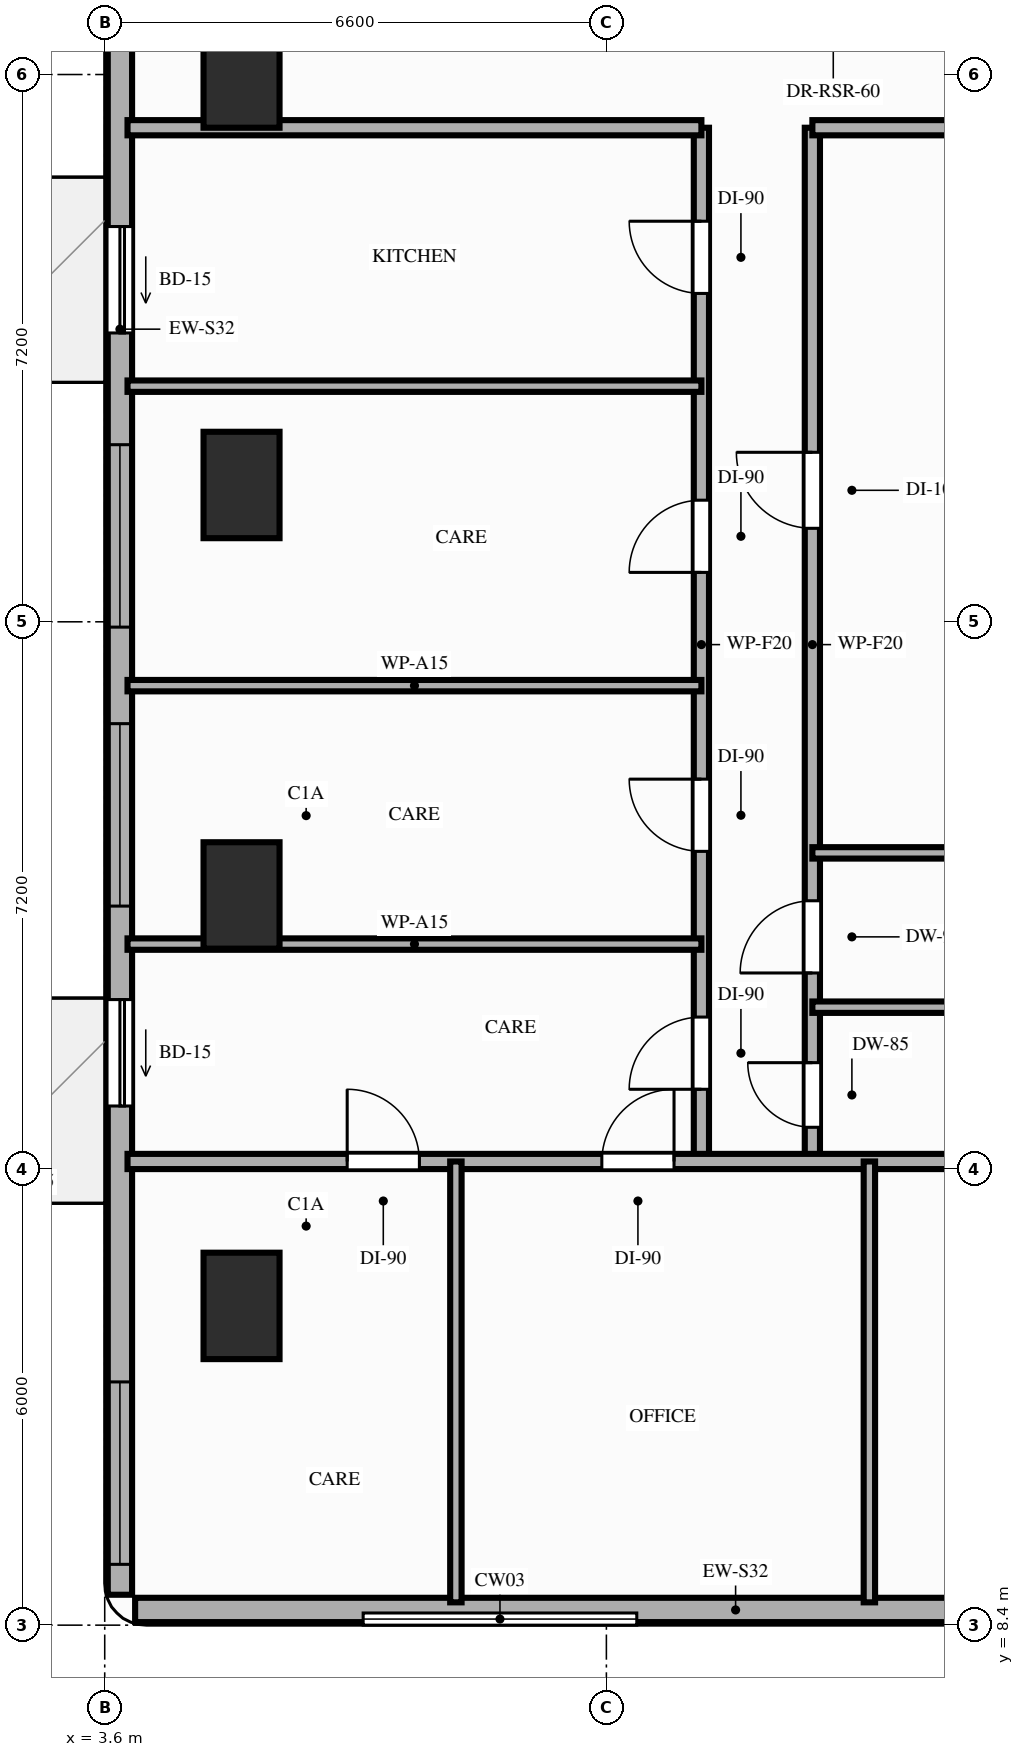
"""IFC4 building model, lengths in metres.
Left out: names, types, materials, properties, quantities, classifications, styles, units other than length and angle.
Written with IfcOpenShell. Run it as: python <this file> out.ifc"""

import sys

from ifc_helpers import new_model, si_unit, direction, frame, frame_2d, origin, origin_2d, place, context, subcontext, project, spatial, rectangle, extrude, element, fill, save


model = new_model("IFC4")
c1 = context("Model", 3, precision=1e-05, world=origin(), true_north=direction((0.0, 1.0)))
c2 = subcontext(c1, "Body", "Model", "MODEL_VIEW")
j1 = project(units=[si_unit("LENGTHUNIT", "METRE"), si_unit("PLANEANGLEUNIT", "RADIAN")], contexts=[c1])
p1 = place(None, origin())
s1 = spatial("IfcSite", under=j1, at=p1, CompositionType="ELEMENT")
p2 = place(p1, origin())
s2 = spatial("IfcBuilding", under=s1, at=p2, CompositionType="ELEMENT")
p3 = place(p2, frame((0.0, 0.0, 53.2)))
s3 = spatial("IfcBuildingStorey", under=s2, at=p3, CompositionType="ELEMENT", Elevation=53.2)
for number, where, z_axis, x_axis in (
    (1, (5.4, 12.6, 0.0), (0.0, 0.0, 1.0), (1.0, 0.0, 0.0)),
    (2, (5.4, 18.0, 0.0), (0.0, 0.0, 1.0), (1.0, 0.0, 0.0)),
    (3, (5.4, 23.4, 0.0), (0.0, 0.0, 1.0), (1.0, 0.0, 0.0)),
    (4, (5.4, 28.8, 0.0), (0.0, 0.0, 1.0), (1.0, 0.0, 0.0)),
):
    element("IfcColumn", number, at=place(p3, frame(where, z_axis=z_axis, x_axis=x_axis)), inside=s3, PredefinedType="COLUMN", context=c2, shape_type="SweptSolid", body=[
        extrude(rectangle(XDim=1.0, YDim=1.4, at=origin_2d()), origin(), (0.0, 0.0, 1.0), 3.2),
    ])
p4 = place(p3, frame((4.0, 8.6, 0.0), z_axis=(0.0, 0.0, 1.0), x_axis=(1.0, 0.0, 0.0)))
e5 = element("IfcWall", 5, at=p4, inside=s3, PredefinedType="STANDARD", context=c2, shape_type="SweptSolid", body=[
    extrude(rectangle(XDim=15.8, YDim=0.32, at=frame_2d((7.9, 0.0))), origin(), (0.0, 0.0, 1.0), 3.02),
])
p5 = place(p4, frame((11.2, 0.0, 0.85)))
e6 = element("IfcOpeningElement", 6, at=p5, cuts=e5, PredefinedType="OPENING", context=c2, shape_type="SweptSolid", body=[
    extrude(rectangle(XDim=2.4, YDim=1.8, at=frame_2d((1.2, 0.9))), frame((0.0, 0.17, 0.0), z_axis=(0.0, -1.0, 0.0), x_axis=(1.0, 0.0, 0.0)), (0.0, 0.0, 1.0), 0.34),
])
p6 = place(p3, frame((3.8, 42.1, 0.0), z_axis=(0.0, 0.0, 1.0), x_axis=(0.0, -1.0, 0.0)))
e7 = element("IfcWall", 7, at=p6, inside=s3, PredefinedType="STANDARD", context=c2, shape_type="SweptSolid", body=[
    extrude(rectangle(XDim=33.3, YDim=0.32, at=frame_2d((16.65, 0.0))), origin(), (0.0, 0.0, 1.0), 2.71),
])
p7 = place(p6, frame((25.47, 0.0, 0.0)))
e8 = element("IfcOpeningElement", 8, at=p7, cuts=e7, PredefinedType="OPENING", context=c2, shape_type="SweptSolid", body=[
    extrude(rectangle(XDim=1.4, YDim=2.1, at=frame_2d((0.7, 1.05))), frame((0.0, 0.17, 0.0), z_axis=(0.0, -1.0, 0.0), x_axis=(1.0, 0.0, 0.0)), (0.0, 0.0, 1.0), 0.34),
])
p8 = place(p6, frame((15.3, 0.0, 0.0)))
e9 = element("IfcOpeningElement", 9, at=p8, cuts=e7, PredefinedType="OPENING", context=c2, shape_type="SweptSolid", body=[
    extrude(rectangle(XDim=1.4, YDim=2.1, at=frame_2d((0.7, 1.05))), frame((0.0, 0.17, 0.0), z_axis=(0.0, -1.0, 0.0), x_axis=(1.0, 0.0, 0.0)), (0.0, 0.0, 1.0), 0.34),
])
p9 = place(p6, frame((21.84, 0.0, 0.85)))
e10 = element("IfcOpeningElement", 10, at=p9, cuts=e7, PredefinedType="OPENING", context=c2, shape_type="SweptSolid", body=[
    extrude(rectangle(XDim=2.4, YDim=1.61, at=frame_2d((1.2, 0.805))), frame((0.0, 0.17, 0.0), z_axis=(0.0, -1.0, 0.0), x_axis=(1.0, 0.0, 0.0)), (0.0, 0.0, 1.0), 0.34),
])
p10 = place(p6, frame((18.17, 0.0, 0.85)))
e11 = element("IfcOpeningElement", 11, at=p10, cuts=e7, PredefinedType="OPENING", context=c2, shape_type="SweptSolid", body=[
    extrude(rectangle(XDim=2.4, YDim=1.61, at=frame_2d((1.2, 0.805))), frame((0.0, 0.17, 0.0), z_axis=(0.0, -1.0, 0.0), x_axis=(1.0, 0.0, 0.0)), (0.0, 0.0, 1.0), 0.34),
])
p11 = place(p6, frame((30.5, 0.0, 0.85)))
e12 = element("IfcOpeningElement", 12, at=p11, cuts=e7, PredefinedType="OPENING", context=c2, shape_type="SweptSolid", body=[
    extrude(rectangle(XDim=2.4, YDim=1.61, at=frame_2d((1.2, 0.805))), frame((0.0, 0.17, 0.0), z_axis=(0.0, -1.0, 0.0), x_axis=(1.0, 0.0, 0.0)), (0.0, 0.0, 1.0), 0.34),
])
p12 = place(p6, frame((9.6, 0.0, 0.85)))
e13 = element("IfcOpeningElement", 13, at=p12, cuts=e7, PredefinedType="OPENING", context=c2, shape_type="SweptSolid", body=[
    extrude(rectangle(XDim=2.4, YDim=1.61, at=frame_2d((1.2, 0.805))), frame((0.0, 0.17, 0.0), z_axis=(0.0, -1.0, 0.0), x_axis=(1.0, 0.0, 0.0)), (0.0, 0.0, 1.0), 0.34),
])
p13 = place(p6, frame((3.5, 0.0, 0.85)))
e14 = element("IfcOpeningElement", 14, at=p13, cuts=e7, PredefinedType="OPENING", context=c2, shape_type="SweptSolid", body=[
    extrude(rectangle(XDim=2.4, YDim=1.61, at=frame_2d((1.2, 0.805))), frame((0.0, 0.17, 0.0), z_axis=(0.0, -1.0, 0.0), x_axis=(1.0, 0.0, 0.0)), (0.0, 0.0, 1.0), 0.34),
])
p14 = place(p3, frame((11.45, 14.5, 0.0), z_axis=(0.0, 0.0, 1.0), x_axis=(0.0, 1.0, 0.0)))
e15 = element("IfcWall", 15, at=p14, inside=s3, PredefinedType="PARTITIONING", context=c2, shape_type="SweptSolid", body=[
    extrude(rectangle(XDim=13.6, YDim=0.2, at=frame_2d((6.8, 0.0))), origin(), (0.0, 0.0, 1.0), 2.41),
])
p15 = place(p14, frame((0.95, 0.0, 0.0)))
e16 = element("IfcOpeningElement", 16, at=p15, cuts=e15, PredefinedType="OPENING", context=c2, shape_type="SweptSolid", body=[
    extrude(rectangle(XDim=0.95, YDim=2.15, at=frame_2d((0.475, 1.075))), frame((0.0, 0.11, 0.0), z_axis=(0.0, -1.0, 0.0), x_axis=(1.0, 0.0, 0.0)), (0.0, 0.0, 1.0), 0.22),
])
p16 = place(p14, frame((4.08, 0.0, 0.0)))
e17 = element("IfcOpeningElement", 17, at=p16, cuts=e15, PredefinedType="OPENING", context=c2, shape_type="SweptSolid", body=[
    extrude(rectangle(XDim=0.95, YDim=2.15, at=frame_2d((0.475, 1.075))), frame((0.0, 0.11, 0.0), z_axis=(0.0, -1.0, 0.0), x_axis=(1.0, 0.0, 0.0)), (0.0, 0.0, 1.0), 0.22),
])
p17 = place(p14, frame((7.75, 0.0, 0.0)))
e18 = element("IfcOpeningElement", 18, at=p17, cuts=e15, PredefinedType="OPENING", context=c2, shape_type="SweptSolid", body=[
    extrude(rectangle(XDim=0.95, YDim=2.15, at=frame_2d((0.475, 1.075))), frame((0.0, 0.11, 0.0), z_axis=(0.0, -1.0, 0.0), x_axis=(1.0, 0.0, 0.0)), (0.0, 0.0, 1.0), 0.22),
])
p18 = place(p14, frame((11.42, 0.0, 0.0)))
e19 = element("IfcOpeningElement", 19, at=p18, cuts=e15, PredefinedType="OPENING", context=c2, shape_type="SweptSolid", body=[
    extrude(rectangle(XDim=0.95, YDim=2.15, at=frame_2d((0.475, 1.075))), frame((0.0, 0.11, 0.0), z_axis=(0.0, -1.0, 0.0), x_axis=(1.0, 0.0, 0.0)), (0.0, 0.0, 1.0), 0.22),
])
p19 = place(p3, frame((12.91, 14.5, 0.0), z_axis=(0.0, 0.0, 1.0), x_axis=(0.0, 1.0, 0.0)))
e20 = element("IfcWall", 20, at=p19, inside=s3, PredefinedType="PARTITIONING", context=c2, shape_type="SweptSolid", body=[
    extrude(rectangle(XDim=13.6, YDim=0.2, at=frame_2d((6.8, 0.0))), origin(), (0.0, 0.0, 1.0), 2.41),
])
p20 = place(p19, frame((0.45, 0.0, 0.0)))
e21 = element("IfcOpeningElement", 21, at=p20, cuts=e20, PredefinedType="OPENING", context=c2, shape_type="SweptSolid", body=[
    extrude(rectangle(XDim=0.85, YDim=2.1, at=frame_2d((0.425, 1.05))), frame((0.0, 0.11, 0.0), z_axis=(0.0, -1.0, 0.0), x_axis=(1.0, 0.0, 0.0)), (0.0, 0.0, 1.0), 0.22),
])
p21 = place(p19, frame((2.48, 0.0, 0.0)))
e22 = element("IfcOpeningElement", 22, at=p21, cuts=e20, PredefinedType="OPENING", context=c2, shape_type="SweptSolid", body=[
    extrude(rectangle(XDim=0.95, YDim=2.1, at=frame_2d((0.475, 1.05))), frame((0.0, 0.11, 0.0), z_axis=(0.0, -1.0, 0.0), x_axis=(1.0, 0.0, 0.0)), (0.0, 0.0, 1.0), 0.22),
])
p22 = place(p19, frame((8.33, 0.0, 0.0)))
e23 = element("IfcOpeningElement", 23, at=p22, cuts=e20, PredefinedType="OPENING", context=c2, shape_type="SweptSolid", body=[
    extrude(rectangle(XDim=1.0, YDim=2.15, at=frame_2d((0.5, 1.075))), frame((0.0, 0.11, 0.0), z_axis=(0.0, -1.0, 0.0), x_axis=(1.0, 0.0, 0.0)), (0.0, 0.0, 1.0), 0.22),
])
p23 = place(p3, frame((3.9, 14.5, 0.0), z_axis=(0.0, 0.0, 1.0), x_axis=(1.0, 0.0, 0.0)))
e24 = element("IfcWall", 24, at=p23, inside=s3, PredefinedType="PARTITIONING", context=c2, shape_type="SweptSolid", body=[
    extrude(rectangle(XDim=16.0, YDim=0.2, at=frame_2d((8.0, 0.0))), origin(), (0.0, 0.0, 1.0), 2.41),
])
p24 = place(p23, frame((2.89, 0.0, 0.0)))
e25 = element("IfcOpeningElement", 25, at=p24, cuts=e24, PredefinedType="OPENING", context=c2, shape_type="SweptSolid", body=[
    extrude(rectangle(XDim=0.95, YDim=2.15, at=frame_2d((0.475, 1.075))), frame((0.0, 0.11, 0.0), z_axis=(0.0, -1.0, 0.0), x_axis=(1.0, 0.0, 0.0)), (0.0, 0.0, 1.0), 0.22),
])
p25 = place(p23, frame((6.24, 0.0, 0.0)))
e26 = element("IfcOpeningElement", 26, at=p25, cuts=e24, PredefinedType="OPENING", context=c2, shape_type="SweptSolid", body=[
    extrude(rectangle(XDim=0.95, YDim=2.15, at=frame_2d((0.475, 1.075))), frame((0.0, 0.11, 0.0), z_axis=(0.0, -1.0, 0.0), x_axis=(1.0, 0.0, 0.0)), (0.0, 0.0, 1.0), 0.22),
])
p26 = place(p23, frame((12.4, 0.0, 0.0)))
e27 = element("IfcOpeningElement", 27, at=p26, cuts=e24, PredefinedType="OPENING", context=c2, shape_type="SweptSolid", body=[
    extrude(rectangle(XDim=0.95, YDim=2.15, at=frame_2d((0.475, 1.075))), frame((0.0, 0.11, 0.0), z_axis=(0.0, -1.0, 0.0), x_axis=(1.0, 0.0, 0.0)), (0.0, 0.0, 1.0), 0.22),
])
p27 = place(p3, frame((3.9, 28.1, 0.0), z_axis=(0.0, 0.0, 1.0), x_axis=(1.0, 0.0, 0.0)))
e28 = element("IfcWall", 28, at=p27, inside=s3, PredefinedType="PARTITIONING", context=c2, shape_type="SweptSolid", body=[
    extrude(rectangle(XDim=7.55, YDim=0.2, at=frame_2d((3.775, 0.0))), origin(), (0.0, 0.0, 1.0), 2.41),
])
p28 = place(p3, frame((12.91, 28.1, 0.0), z_axis=(0.0, 0.0, 1.0), x_axis=(1.0, 0.0, 0.0)))
e29 = element("IfcWall", 29, at=p28, inside=s3, PredefinedType="PARTITIONING", context=c2, shape_type="SweptSolid", body=[
    extrude(rectangle(XDim=6.99, YDim=0.2, at=frame_2d((3.495, 0.0))), origin(), (0.0, 0.0, 1.0), 2.41),
])
for number, where, z_axis, x_axis in (
    (30, (3.9, 17.36, 0.0), (0.0, 0.0, 1.0), (1.0, 0.0, 0.0)),
    (31, (3.9, 20.76, 0.0), (0.0, 0.0, 1.0), (1.0, 0.0, 0.0)),
    (32, (3.9, 24.7, 0.0), (0.0, 0.0, 1.0), (1.0, 0.0, 0.0)),
):
    element("IfcWall", number, at=place(p3, frame(where, z_axis=z_axis, x_axis=x_axis)), inside=s3, PredefinedType="PARTITIONING", context=c2, shape_type="SweptSolid", body=[
        extrude(rectangle(XDim=7.55, YDim=0.15, at=frame_2d((3.775, 0.0))), origin(), (0.0, 0.0, 1.0), 2.41),
    ])
for number, where, z_axis, x_axis in (
    (33, (8.22, 8.7, 0.0), (0.0, 0.0, 1.0), (0.0, 1.0, 0.0)),
    (34, (13.66, 8.7, 0.0), (0.0, 0.0, 1.0), (0.0, 1.0, 0.0)),
):
    element("IfcWall", number, at=place(p3, frame(where, z_axis=z_axis, x_axis=x_axis)), inside=s3, PredefinedType="PARTITIONING", context=c2, shape_type="SweptSolid", body=[
        extrude(rectangle(XDim=5.8, YDim=0.15, at=frame_2d((2.9, 0.0))), origin(), (0.0, 0.0, 1.0), 2.41),
    ])
for number, where, z_axis, x_axis in (
    (35, (12.91, 16.53, 0.0), (0.0, 0.0, 1.0), (1.0, 0.0, 0.0)),
    (36, (12.91, 18.56, 0.0), (0.0, 0.0, 1.0), (1.0, 0.0, 0.0)),
):
    element("IfcWall", number, at=place(p3, frame(where, z_axis=z_axis, x_axis=x_axis)), inside=s3, PredefinedType="PARTITIONING", context=c2, shape_type="SweptSolid", body=[
        extrude(rectangle(XDim=6.99, YDim=0.15, at=frame_2d((3.495, 0.0))), origin(), (0.0, 0.0, 1.0), 2.41),
    ])
p29 = place(p7, origin())
e37 = element("IfcDoor", 37, at=p29, inside=s3, OperationType="SLIDING_TO_RIGHT", PredefinedType="DOOR", context=c2, shape_type="SweptSolid", body=[
    extrude(rectangle(XDim=1.4, YDim=2.1, at=frame_2d((0.7, 1.05))), frame((0.0, 0.025, 0.0), z_axis=(0.0, -1.0, 0.0), x_axis=(1.0, 0.0, 0.0)), (0.0, 0.0, 1.0), 0.05),
])
fill(e8, e37)
p30 = place(p8, origin())
e38 = element("IfcDoor", 38, at=p30, inside=s3, OperationType="SLIDING_TO_RIGHT", PredefinedType="DOOR", context=c2, shape_type="SweptSolid", body=[
    extrude(rectangle(XDim=1.4, YDim=2.1, at=frame_2d((0.7, 1.05))), frame((0.0, 0.025, 0.0), z_axis=(0.0, -1.0, 0.0), x_axis=(1.0, 0.0, 0.0)), (0.0, 0.0, 1.0), 0.05),
])
fill(e9, e38)
p31 = place(p9, origin())
e39 = element("IfcWindow", 39, at=p31, inside=s3, PartitioningType="SINGLE_PANEL", PredefinedType="WINDOW", context=c2, shape_type="SweptSolid", body=[
    extrude(rectangle(XDim=2.4, YDim=1.61, at=frame_2d((1.2, 0.805))), frame((0.0, 0.03, 0.0), z_axis=(0.0, -1.0, 0.0), x_axis=(1.0, 0.0, 0.0)), (0.0, 0.0, 1.0), 0.06),
])
fill(e10, e39)
p32 = place(p10, origin())
e40 = element("IfcWindow", 40, at=p32, inside=s3, PartitioningType="SINGLE_PANEL", PredefinedType="WINDOW", context=c2, shape_type="SweptSolid", body=[
    extrude(rectangle(XDim=2.4, YDim=1.61, at=frame_2d((1.2, 0.805))), frame((0.0, 0.03, 0.0), z_axis=(0.0, -1.0, 0.0), x_axis=(1.0, 0.0, 0.0)), (0.0, 0.0, 1.0), 0.06),
])
fill(e11, e40)
p33 = place(p11, origin())
e41 = element("IfcWindow", 41, at=p33, inside=s3, PartitioningType="SINGLE_PANEL", PredefinedType="WINDOW", context=c2, shape_type="SweptSolid", body=[
    extrude(rectangle(XDim=2.4, YDim=1.61, at=frame_2d((1.2, 0.805))), frame((0.0, 0.03, 0.0), z_axis=(0.0, -1.0, 0.0), x_axis=(1.0, 0.0, 0.0)), (0.0, 0.0, 1.0), 0.06),
])
fill(e12, e41)
p34 = place(p15, origin())
e42 = element("IfcDoor", 42, at=p34, inside=s3, OperationType="SINGLE_SWING_LEFT", PredefinedType="DOOR", context=c2, shape_type="SweptSolid", body=[
    extrude(rectangle(XDim=0.95, YDim=2.15, at=frame_2d((0.475, 1.075))), frame((0.0, 0.025, 0.0), z_axis=(0.0, -1.0, 0.0), x_axis=(1.0, 0.0, 0.0)), (0.0, 0.0, 1.0), 0.05),
])
fill(e16, e42)
p35 = place(p16, origin())
e43 = element("IfcDoor", 43, at=p35, inside=s3, OperationType="SINGLE_SWING_RIGHT", PredefinedType="DOOR", context=c2, shape_type="SweptSolid", body=[
    extrude(rectangle(XDim=0.95, YDim=2.15, at=frame_2d((0.475, 1.075))), frame((0.0, 0.025, 0.0), z_axis=(0.0, -1.0, 0.0), x_axis=(1.0, 0.0, 0.0)), (0.0, 0.0, 1.0), 0.05),
])
fill(e17, e43)
p36 = place(p17, origin())
e44 = element("IfcDoor", 44, at=p36, inside=s3, OperationType="SINGLE_SWING_LEFT", PredefinedType="DOOR", context=c2, shape_type="SweptSolid", body=[
    extrude(rectangle(XDim=0.95, YDim=2.15, at=frame_2d((0.475, 1.075))), frame((0.0, 0.025, 0.0), z_axis=(0.0, -1.0, 0.0), x_axis=(1.0, 0.0, 0.0)), (0.0, 0.0, 1.0), 0.05),
])
fill(e18, e44)
p37 = place(p18, origin())
e45 = element("IfcDoor", 45, at=p37, inside=s3, OperationType="SINGLE_SWING_RIGHT", PredefinedType="DOOR", context=c2, shape_type="SweptSolid", body=[
    extrude(rectangle(XDim=0.95, YDim=2.15, at=frame_2d((0.475, 1.075))), frame((0.0, 0.025, 0.0), z_axis=(0.0, -1.0, 0.0), x_axis=(1.0, 0.0, 0.0)), (0.0, 0.0, 1.0), 0.05),
])
fill(e19, e45)
p38 = place(p24, origin())
e46 = element("IfcDoor", 46, at=p38, inside=s3, OperationType="SINGLE_SWING_LEFT", PredefinedType="DOOR", context=c2, shape_type="SweptSolid", body=[
    extrude(rectangle(XDim=0.95, YDim=2.15, at=frame_2d((0.475, 1.075))), frame((0.0, 0.025, 0.0), z_axis=(0.0, -1.0, 0.0), x_axis=(1.0, 0.0, 0.0)), (0.0, 0.0, 1.0), 0.05),
])
fill(e25, e46)
p39 = place(p25, origin())
e47 = element("IfcDoor", 47, at=p39, inside=s3, OperationType="SINGLE_SWING_RIGHT", PredefinedType="DOOR", context=c2, shape_type="SweptSolid", body=[
    extrude(rectangle(XDim=0.95, YDim=2.15, at=frame_2d((0.475, 1.075))), frame((0.0, 0.025, 0.0), z_axis=(0.0, -1.0, 0.0), x_axis=(1.0, 0.0, 0.0)), (0.0, 0.0, 1.0), 0.05),
])
fill(e26, e47)
p40 = place(p20, origin())
e48 = element("IfcDoor", 48, at=p40, inside=s3, OperationType="SINGLE_SWING_RIGHT", PredefinedType="DOOR", context=c2, shape_type="SweptSolid", body=[
    extrude(rectangle(XDim=0.85, YDim=2.1, at=frame_2d((0.425, 1.05))), frame((0.0, 0.025, 0.0), z_axis=(0.0, -1.0, 0.0), x_axis=(1.0, 0.0, 0.0)), (0.0, 0.0, 1.0), 0.05),
])
fill(e21, e48)
p41 = place(p21, origin())
e49 = element("IfcDoor", 49, at=p41, inside=s3, OperationType="SINGLE_SWING_LEFT", PredefinedType="DOOR", context=c2, shape_type="SweptSolid", body=[
    extrude(rectangle(XDim=0.95, YDim=2.1, at=frame_2d((0.475, 1.05))), frame((0.0, 0.025, 0.0), z_axis=(0.0, -1.0, 0.0), x_axis=(1.0, 0.0, 0.0)), (0.0, 0.0, 1.0), 0.05),
])
fill(e22, e49)
p42 = place(p22, origin())
e50 = element("IfcDoor", 50, at=p42, inside=s3, OperationType="SINGLE_SWING_RIGHT", PredefinedType="DOOR", context=c2, shape_type="SweptSolid", body=[
    extrude(rectangle(XDim=1.0, YDim=2.15, at=frame_2d((0.5, 1.075))), frame((0.0, 0.025, 0.0), z_axis=(0.0, -1.0, 0.0), x_axis=(1.0, 0.0, 0.0)), (0.0, 0.0, 1.0), 0.05),
])
fill(e23, e50)
save(model, sys.argv[1])
